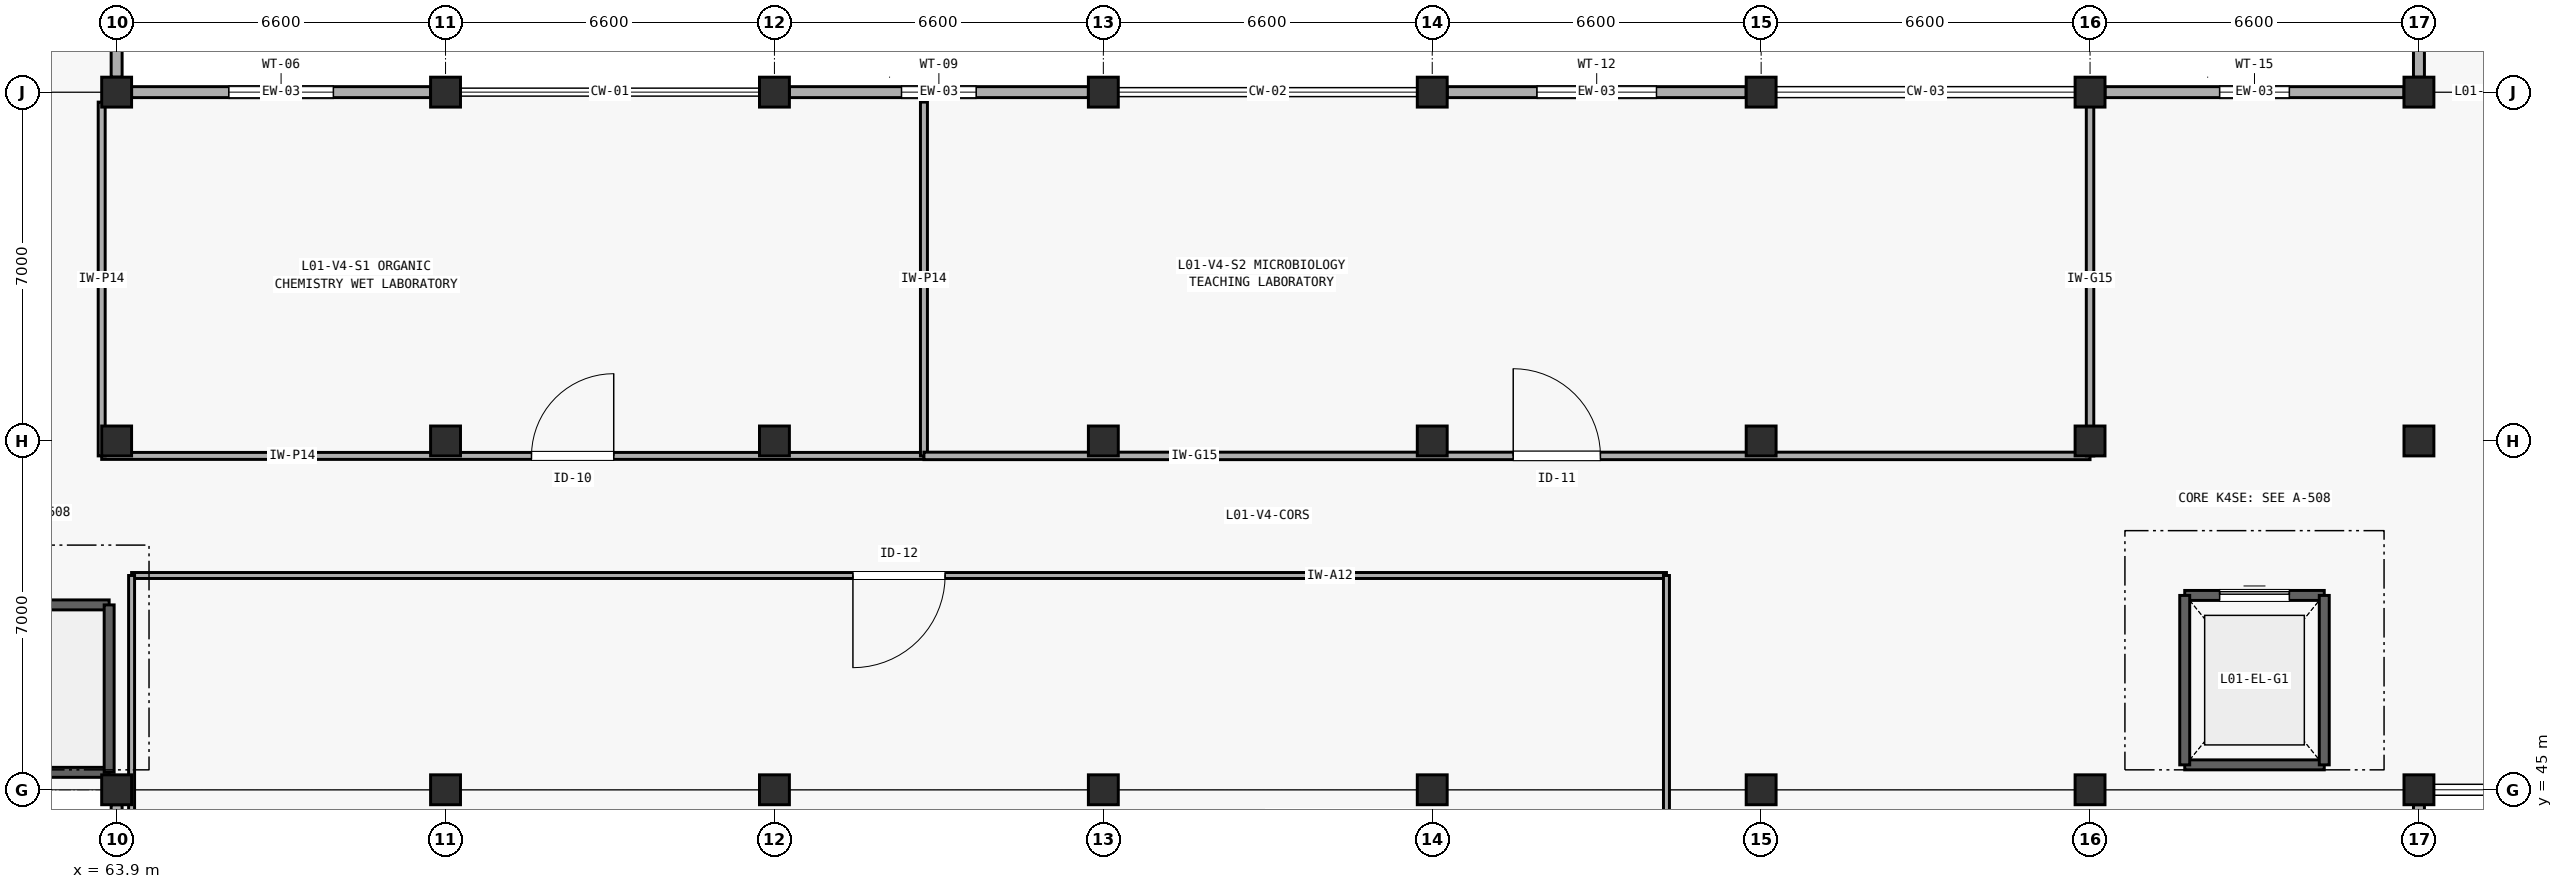
"""IFC4 building model, lengths in metres.
Left out: names, types, materials, properties, quantities, classifications, styles, units other than length and angle.
Written with IfcOpenShell. Run it as: python <this file> out.ifc"""

import sys

from ifc_helpers import new_model, si_unit, direction, frame, frame_2d, origin, origin_2d, place, context, subcontext, project, spatial, rectangle, extrude, element, fill, save


model = new_model("IFC4")
c1 = context("Model", 3, precision=1e-05, world=origin(), true_north=direction((0.0, 1.0)))
c2 = subcontext(c1, "Body", "Model", "MODEL_VIEW")
j1 = project(units=[si_unit("LENGTHUNIT", "METRE"), si_unit("PLANEANGLEUNIT", "RADIAN")], contexts=[c1])
p1 = place(None, origin())
s1 = spatial("IfcSite", under=j1, at=p1, CompositionType="ELEMENT")
p2 = place(p1, origin())
s2 = spatial("IfcBuilding", under=s1, at=p2, CompositionType="ELEMENT")
p3 = place(p2, frame((0.0, 0.0, 4.2)))
s3 = spatial("IfcBuildingStorey", under=s2, at=p3, CompositionType="ELEMENT", Elevation=4.2)
for number, where, z_axis, x_axis in (
    (1, (63.9, 45.0, 0.0), (0.0, 0.0, 1.0), (1.0, 0.0, 0.0)),
    (2, (63.9, 52.0, 0.0), (0.0, 0.0, 1.0), (1.0, 0.0, 0.0)),
    (3, (63.9, 59.0, 0.0), (0.0, 0.0, 1.0), (1.0, 0.0, 0.0)),
    (4, (70.5, 45.0, 0.0), (0.0, 0.0, 1.0), (1.0, 0.0, 0.0)),
    (5, (70.5, 52.0, 0.0), (0.0, 0.0, 1.0), (1.0, 0.0, 0.0)),
    (6, (70.5, 59.0, 0.0), (0.0, 0.0, 1.0), (1.0, 0.0, 0.0)),
    (7, (77.1, 45.0, 0.0), (0.0, 0.0, 1.0), (1.0, 0.0, 0.0)),
    (8, (77.1, 52.0, 0.0), (0.0, 0.0, 1.0), (1.0, 0.0, 0.0)),
    (9, (77.1, 59.0, 0.0), (0.0, 0.0, 1.0), (1.0, 0.0, 0.0)),
    (10, (83.7, 45.0, 0.0), (0.0, 0.0, 1.0), (1.0, 0.0, 0.0)),
    (11, (83.7, 52.0, 0.0), (0.0, 0.0, 1.0), (1.0, 0.0, 0.0)),
    (12, (83.7, 59.0, 0.0), (0.0, 0.0, 1.0), (1.0, 0.0, 0.0)),
    (13, (90.3, 45.0, 0.0), (0.0, 0.0, 1.0), (1.0, 0.0, 0.0)),
    (14, (90.3, 52.0, 0.0), (0.0, 0.0, 1.0), (1.0, 0.0, 0.0)),
    (15, (90.3, 59.0, 0.0), (0.0, 0.0, 1.0), (1.0, 0.0, 0.0)),
    (16, (96.9, 45.0, 0.0), (0.0, 0.0, 1.0), (1.0, 0.0, 0.0)),
    (17, (96.9, 52.0, 0.0), (0.0, 0.0, 1.0), (1.0, 0.0, 0.0)),
    (18, (96.9, 59.0, 0.0), (0.0, 0.0, 1.0), (1.0, 0.0, 0.0)),
    (19, (103.5, 45.0, 0.0), (0.0, 0.0, 1.0), (1.0, 0.0, 0.0)),
    (20, (103.5, 52.0, 0.0), (0.0, 0.0, 1.0), (1.0, 0.0, 0.0)),
    (21, (103.5, 59.0, 0.0), (0.0, 0.0, 1.0), (1.0, 0.0, 0.0)),
    (22, (110.1, 45.0, 0.0), (0.0, 0.0, 1.0), (1.0, 0.0, 0.0)),
    (23, (110.1, 52.0, 0.0), (0.0, 0.0, 1.0), (1.0, 0.0, 0.0)),
    (24, (110.1, 59.0, 0.0), (0.0, 0.0, 1.0), (1.0, 0.0, 0.0)),
):
    element("IfcColumn", number, at=place(p3, frame(where, z_axis=z_axis, x_axis=x_axis)), inside=s3, PredefinedType="COLUMN", context=c2, shape_type="SweptSolid", body=[
        extrude(rectangle(XDim=0.6, YDim=0.6, at=origin_2d()), origin(), (0.0, 0.0, 1.0), 4.2),
    ])
p4 = place(p3, frame((64.2, 59.0, 0.0), z_axis=(0.0, 0.0, 1.0), x_axis=(1.0, 0.0, 0.0)))
e25 = element("IfcWall", 25, at=p4, inside=s3, PredefinedType="SOLIDWALL", context=c2, shape_type="SweptSolid", body=[
    extrude(rectangle(XDim=6.0, YDim=0.22, at=frame_2d((3.0, 0.0))), origin(), (0.0, 0.0, 1.0), 3.135),
])
p5 = place(p4, frame((1.95, 0.0, 0.85)))
e26 = element("IfcOpeningElement", 26, at=p5, cuts=e25, PredefinedType="OPENING", context=c2, shape_type="SweptSolid", body=[
    extrude(rectangle(XDim=2.1, YDim=1.35, at=frame_2d((1.05, 0.675))), frame((0.0, 0.12, 0.0), z_axis=(0.0, -1.0, 0.0), x_axis=(1.0, 0.0, 0.0)), (0.0, 0.0, 1.0), 0.24),
])
p6 = place(p3, frame((77.4, 59.0, 0.0), z_axis=(0.0, 0.0, 1.0), x_axis=(1.0, 0.0, 0.0)))
e27 = element("IfcWall", 27, at=p6, inside=s3, PredefinedType="SOLIDWALL", context=c2, shape_type="SweptSolid", body=[
    extrude(rectangle(XDim=6.0, YDim=0.22, at=frame_2d((3.0, 0.0))), origin(), (0.0, 0.0, 1.0), 3.235),
])
p7 = place(p6, frame((2.25, 0.0, 0.85)))
e28 = element("IfcOpeningElement", 28, at=p7, cuts=e27, PredefinedType="OPENING", context=c2, shape_type="SweptSolid", body=[
    extrude(rectangle(XDim=1.5, YDim=1.5, at=frame_2d((0.75, 0.75))), frame((0.0, 0.12, 0.0), z_axis=(0.0, -1.0, 0.0), x_axis=(1.0, 0.0, 0.0)), (0.0, 0.0, 1.0), 0.24),
])
p8 = place(p3, frame((90.6, 59.0, 0.0), z_axis=(0.0, 0.0, 1.0), x_axis=(1.0, 0.0, 0.0)))
e29 = element("IfcWall", 29, at=p8, inside=s3, PredefinedType="SOLIDWALL", context=c2, shape_type="SweptSolid", body=[
    extrude(rectangle(XDim=6.0, YDim=0.22, at=frame_2d((3.0, 0.0))), origin(), (0.0, 0.0, 1.0), 3.285),
])
p9 = place(p8, frame((1.8, 0.0, 0.85)))
e30 = element("IfcOpeningElement", 30, at=p9, cuts=e29, PredefinedType="OPENING", context=c2, shape_type="SweptSolid", body=[
    extrude(rectangle(XDim=2.4, YDim=1.5, at=frame_2d((1.2, 0.75))), frame((0.0, 0.12, 0.0), z_axis=(0.0, -1.0, 0.0), x_axis=(1.0, 0.0, 0.0)), (0.0, 0.0, 1.0), 0.24),
])
p10 = place(p3, frame((103.8, 59.0, 0.0), z_axis=(0.0, 0.0, 1.0), x_axis=(1.0, 0.0, 0.0)))
e31 = element("IfcWall", 31, at=p10, inside=s3, PredefinedType="SOLIDWALL", context=c2, shape_type="SweptSolid", body=[
    extrude(rectangle(XDim=6.0, YDim=0.22, at=frame_2d((3.0, 0.0))), origin(), (0.0, 0.0, 1.0), 3.385),
])
p11 = place(p10, frame((2.3, 0.0, 0.85)))
e32 = element("IfcOpeningElement", 32, at=p11, cuts=e31, PredefinedType="OPENING", context=c2, shape_type="SweptSolid", body=[
    extrude(rectangle(XDim=1.4, YDim=1.25, at=frame_2d((0.7, 0.625))), frame((0.0, 0.12, 0.0), z_axis=(0.0, -1.0, 0.0), x_axis=(1.0, 0.0, 0.0)), (0.0, 0.0, 1.0), 0.24),
])
p12 = place(p3, frame((63.9, 38.325, 0.0), z_axis=(0.0, 0.0, 1.0), x_axis=(0.0, 1.0, 0.0)))
e33 = element("IfcWall", 33, at=p12, inside=s3, PredefinedType="SOLIDWALL", context=c2, shape_type="SweptSolid", body=[
    extrude(rectangle(XDim=6.375, YDim=0.22, at=frame_2d((3.188, 0.0))), origin(), (0.0, 0.0, 1.0), 3.565),
])
p13 = place(p12, frame((1.488, 0.0, 0.85)))
e34 = element("IfcOpeningElement", 34, at=p13, cuts=e33, PredefinedType="OPENING", context=c2, shape_type="SweptSolid", body=[
    extrude(rectangle(XDim=3.4, YDim=1.2, at=frame_2d((1.7, 0.6))), frame((0.0, 0.12, 0.0), z_axis=(0.0, -1.0, 0.0), x_axis=(1.0, 0.0, 0.0)), (0.0, 0.0, 1.0), 0.24),
])
p14 = place(p3, frame((63.9, 59.3, 0.0), z_axis=(0.0, 0.0, 1.0), x_axis=(0.0, 1.0, 0.0)))
e35 = element("IfcWall", 35, at=p14, inside=s3, PredefinedType="SOLIDWALL", context=c2, shape_type="SweptSolid", body=[
    extrude(rectangle(XDim=6.4, YDim=0.22, at=frame_2d((3.2, 0.0))), origin(), (0.0, 0.0, 1.0), 3.565),
])
p15 = place(p14, frame((2.725, 0.0, 0.85)))
e36 = element("IfcOpeningElement", 36, at=p15, cuts=e35, PredefinedType="OPENING", context=c2, shape_type="SweptSolid", body=[
    extrude(rectangle(XDim=0.95, YDim=1.55, at=frame_2d((0.475, 0.775))), frame((0.0, 0.12, 0.0), z_axis=(0.0, -1.0, 0.0), x_axis=(1.0, 0.0, 0.0)), (0.0, 0.0, 1.0), 0.24),
])
p16 = place(p3, frame((110.1, 38.325, 0.0), z_axis=(0.0, 0.0, 1.0), x_axis=(0.0, 1.0, 0.0)))
e37 = element("IfcWall", 37, at=p16, inside=s3, PredefinedType="SOLIDWALL", context=c2, shape_type="SweptSolid", body=[
    extrude(rectangle(XDim=6.375, YDim=0.22, at=frame_2d((3.188, 0.0))), origin(), (0.0, 0.0, 1.0), 3.505),
])
p17 = place(p16, frame((2.512, 0.0, 0.85)))
e38 = element("IfcOpeningElement", 38, at=p17, cuts=e37, PredefinedType="OPENING", context=c2, shape_type="SweptSolid", body=[
    extrude(rectangle(XDim=1.35, YDim=1.35, at=frame_2d((0.675, 0.675))), frame((0.0, 0.12, 0.0), z_axis=(0.0, -1.0, 0.0), x_axis=(1.0, 0.0, 0.0)), (0.0, 0.0, 1.0), 0.24),
])
p18 = place(p3, frame((110.1, 59.3, 0.0), z_axis=(0.0, 0.0, 1.0), x_axis=(0.0, 1.0, 0.0)))
e39 = element("IfcWall", 39, at=p18, inside=s3, PredefinedType="SOLIDWALL", context=c2, shape_type="SweptSolid", body=[
    extrude(rectangle(XDim=6.4, YDim=0.22, at=frame_2d((3.2, 0.0))), origin(), (0.0, 0.0, 1.0), 3.505),
])
p19 = place(p18, frame((2.375, 0.0, 0.85)))
e40 = element("IfcOpeningElement", 40, at=p19, cuts=e39, PredefinedType="OPENING", context=c2, shape_type="SweptSolid", body=[
    extrude(rectangle(XDim=1.65, YDim=1.35, at=frame_2d((0.825, 0.675))), frame((0.0, 0.12, 0.0), z_axis=(0.0, -1.0, 0.0), x_axis=(1.0, 0.0, 0.0)), (0.0, 0.0, 1.0), 0.24),
])
p20 = place(p3, frame((57.45, 45.35, 0.0), z_axis=(0.0, 0.0, 1.0), x_axis=(1.0, 0.0, 0.0)))
e41 = element("IfcWall", 41, at=p20, inside=s3, PredefinedType="SHEAR", context=c2, shape_type="SweptSolid", body=[
    extrude(rectangle(XDim=6.3, YDim=0.2, at=frame_2d((3.15, 0.0))), origin(), (0.0, 0.0, 1.0), 4.2),
])
p21 = place(p3, frame((57.45, 48.71, 0.0), z_axis=(0.0, 0.0, 1.0), x_axis=(1.0, 0.0, 0.0)))
e42 = element("IfcWall", 42, at=p21, inside=s3, PredefinedType="SHEAR", context=c2, shape_type="SweptSolid", body=[
    extrude(rectangle(XDim=6.3, YDim=0.2, at=frame_2d((3.15, 0.0))), origin(), (0.0, 0.0, 1.0), 4.2),
])
p22 = place(p21, frame((0.32, 0.0, 0.0)))
e43 = element("IfcOpeningElement", 43, at=p22, cuts=e42, PredefinedType="OPENING", context=c2, shape_type="SweptSolid", body=[
    extrude(rectangle(XDim=1.2, YDim=2.15, at=frame_2d((0.6, 1.075))), frame((0.0, 0.11, 0.0), z_axis=(0.0, -1.0, 0.0), x_axis=(1.0, 0.0, 0.0)), (0.0, 0.0, 1.0), 0.22),
])
p23 = place(p3, frame((63.75, 45.35, 0.0), z_axis=(0.0, 0.0, 1.0), x_axis=(0.0, 1.0, 0.0)))
e44 = element("IfcWall", 44, at=p23, inside=s3, PredefinedType="SHEAR", context=c2, shape_type="SweptSolid", body=[
    extrude(rectangle(XDim=3.36, YDim=0.2, at=frame_2d((1.68, 0.0))), origin(), (0.0, 0.0, 1.0), 4.2),
])
p24 = place(p3, frame((105.4, 45.5, 0.0), z_axis=(0.0, 0.0, 1.0), x_axis=(1.0, 0.0, 0.0)))
e45 = element("IfcWall", 45, at=p24, inside=s3, PredefinedType="SHEAR", context=c2, shape_type="SweptSolid", body=[
    extrude(rectangle(XDim=2.8, YDim=0.2, at=frame_2d((1.4, 0.0))), origin(), (0.0, 0.0, 1.0), 4.2),
])
p25 = place(p3, frame((105.4, 48.9, 0.0), z_axis=(0.0, 0.0, 1.0), x_axis=(1.0, 0.0, 0.0)))
e46 = element("IfcWall", 46, at=p25, inside=s3, PredefinedType="SHEAR", context=c2, shape_type="SweptSolid", body=[
    extrude(rectangle(XDim=2.8, YDim=0.2, at=frame_2d((1.4, 0.0))), origin(), (0.0, 0.0, 1.0), 4.2),
])
p26 = place(p25, frame((0.7, 0.0, 0.0)))
e47 = element("IfcOpeningElement", 47, at=p26, cuts=e46, PredefinedType="OPENING", context=c2, shape_type="SweptSolid", body=[
    extrude(rectangle(XDim=1.4, YDim=2.3, at=frame_2d((0.7, 1.15))), frame((0.0, 0.11, 0.0), z_axis=(0.0, -1.0, 0.0), x_axis=(1.0, 0.0, 0.0)), (0.0, 0.0, 1.0), 0.22),
])
for number, where, z_axis, x_axis in (
    (48, (105.4, 45.5, 0.0), (0.0, 0.0, 1.0), (0.0, 1.0, 0.0)),
    (49, (108.2, 45.5, 0.0), (0.0, 0.0, 1.0), (0.0, 1.0, 0.0)),
):
    element("IfcWall", number, at=place(p3, frame(where, z_axis=z_axis, x_axis=x_axis)), inside=s3, PredefinedType="SHEAR", context=c2, shape_type="SweptSolid", body=[
        extrude(rectangle(XDim=3.4, YDim=0.2, at=frame_2d((1.7, 0.0))), origin(), (0.0, 0.0, 1.0), 4.2),
    ])
p27 = place(p3, frame((63.6, 51.7, 0.0), z_axis=(0.0, 0.0, 1.0), x_axis=(1.0, 0.0, 0.0)))
e50 = element("IfcWall", 50, at=p27, inside=s3, PredefinedType="PLUMBINGWALL", context=c2, shape_type="SweptSolid", body=[
    extrude(rectangle(XDim=16.5, YDim=0.14, at=frame_2d((8.25, 0.0))), origin(), (0.0, 0.0, 1.0), 3.135),
])
p28 = place(p27, frame((8.625, 0.0, 0.0)))
e51 = element("IfcOpeningElement", 51, at=p28, cuts=e50, PredefinedType="OPENING", context=c2, shape_type="SweptSolid", body=[
    extrude(rectangle(XDim=1.65, YDim=2.25, at=frame_2d((0.825, 1.125))), frame((0.0, 0.08, 0.0), z_axis=(0.0, -1.0, 0.0), x_axis=(1.0, 0.0, 0.0)), (0.0, 0.0, 1.0), 0.16),
])
p29 = place(p3, frame((63.6, 51.7, 0.0), z_axis=(0.0, 0.0, 1.0), x_axis=(0.0, 1.0, 0.0)))
e52 = element("IfcWall", 52, at=p29, inside=s3, PredefinedType="PLUMBINGWALL", context=c2, shape_type="SweptSolid", body=[
    extrude(rectangle(XDim=7.1, YDim=0.14, at=frame_2d((3.55, 0.0))), origin(), (0.0, 0.0, 1.0), 3.405),
])
p30 = place(p3, frame((80.1, 51.7, 0.0), z_axis=(0.0, 0.0, 1.0), x_axis=(0.0, 1.0, 0.0)))
e53 = element("IfcWall", 53, at=p30, inside=s3, PredefinedType="PLUMBINGWALL", context=c2, shape_type="SweptSolid", body=[
    extrude(rectangle(XDim=7.1, YDim=0.14, at=frame_2d((3.55, 0.0))), origin(), (0.0, 0.0, 1.0), 3.532),
])
p31 = place(p3, frame((80.1, 51.7, 0.0), z_axis=(0.0, 0.0, 1.0), x_axis=(1.0, 0.0, 0.0)))
e54 = element("IfcWall", 54, at=p31, inside=s3, PredefinedType="PARTITIONING", context=c2, shape_type="SweptSolid", body=[
    extrude(rectangle(XDim=23.4, YDim=0.15, at=frame_2d((11.7, 0.0))), origin(), (0.0, 0.0, 1.0), 3.235),
])
p32 = place(p31, frame((11.825, 0.0, 0.0)))
e55 = element("IfcOpeningElement", 55, at=p32, cuts=e54, PredefinedType="OPENING", context=c2, shape_type="SweptSolid", body=[
    extrude(rectangle(XDim=1.75, YDim=2.25, at=frame_2d((0.875, 1.125))), frame((0.0, 0.085, 0.0), z_axis=(0.0, -1.0, 0.0), x_axis=(1.0, 0.0, 0.0)), (0.0, 0.0, 1.0), 0.17),
])
p33 = place(p3, frame((103.5, 51.7, 0.0), z_axis=(0.0, 0.0, 1.0), x_axis=(0.0, 1.0, 0.0)))
e56 = element("IfcWall", 56, at=p33, inside=s3, PredefinedType="PARTITIONING", context=c2, shape_type="SweptSolid", body=[
    extrude(rectangle(XDim=7.1, YDim=0.15, at=frame_2d((3.55, 0.0))), origin(), (0.0, 0.0, 1.0), 3.405),
])
p34 = place(p3, frame((64.2, 49.3, 0.0), z_axis=(0.0, 0.0, 1.0), x_axis=(1.0, 0.0, 0.0)))
e57 = element("IfcWall", 57, at=p34, inside=s3, PredefinedType="PARTITIONING", context=c2, shape_type="SweptSolid", body=[
    extrude(rectangle(XDim=30.8, YDim=0.12, at=frame_2d((15.4, 0.0))), origin(), (0.0, 0.0, 1.0), 3.9),
])
p35 = place(p34, frame((14.475, 0.0, 0.0)))
e58 = element("IfcOpeningElement", 58, at=p35, cuts=e57, PredefinedType="OPENING", context=c2, shape_type="SweptSolid", body=[
    extrude(rectangle(XDim=1.85, YDim=2.3, at=frame_2d((0.925, 1.15))), frame((0.0, 0.07, 0.0), z_axis=(0.0, -1.0, 0.0), x_axis=(1.0, 0.0, 0.0)), (0.0, 0.0, 1.0), 0.14),
])
for number, where, z_axis, x_axis in (
    (59, (64.2, 38.2, 0.0), (0.0, 0.0, 1.0), (0.0, 1.0, 0.0)),
    (60, (95.0, 38.2, 0.0), (0.0, 0.0, 1.0), (0.0, 1.0, 0.0)),
):
    element("IfcWall", number, at=place(p3, frame(where, z_axis=z_axis, x_axis=x_axis)), inside=s3, PredefinedType="PARTITIONING", context=c2, shape_type="SweptSolid", body=[
        extrude(rectangle(XDim=11.1, YDim=0.12, at=frame_2d((5.55, 0.0))), origin(), (0.0, 0.0, 1.0), 3.9),
    ])
p36 = place(p5, origin())
e61 = element("IfcWindow", 61, at=p36, inside=s3, PartitioningType="SINGLE_PANEL", PredefinedType="WINDOW", context=c2, shape_type="SweptSolid", body=[
    extrude(rectangle(XDim=2.1, YDim=1.35, at=frame_2d((1.05, 0.675))), frame((0.0, 0.03, 0.0), z_axis=(0.0, -1.0, 0.0), x_axis=(1.0, 0.0, 0.0)), (0.0, 0.0, 1.0), 0.06),
])
fill(e26, e61)
p37 = place(p7, origin())
e62 = element("IfcWindow", 62, at=p37, inside=s3, PartitioningType="SINGLE_PANEL", PredefinedType="WINDOW", context=c2, shape_type="SweptSolid", body=[
    extrude(rectangle(XDim=1.5, YDim=1.5, at=frame_2d((0.75, 0.75))), frame((0.0, 0.03, 0.0), z_axis=(0.0, -1.0, 0.0), x_axis=(1.0, 0.0, 0.0)), (0.0, 0.0, 1.0), 0.06),
])
fill(e28, e62)
p38 = place(p9, origin())
e63 = element("IfcWindow", 63, at=p38, inside=s3, PartitioningType="SINGLE_PANEL", PredefinedType="WINDOW", context=c2, shape_type="SweptSolid", body=[
    extrude(rectangle(XDim=2.4, YDim=1.5, at=frame_2d((1.2, 0.75))), frame((0.0, 0.03, 0.0), z_axis=(0.0, -1.0, 0.0), x_axis=(1.0, 0.0, 0.0)), (0.0, 0.0, 1.0), 0.06),
])
fill(e30, e63)
p39 = place(p11, origin())
e64 = element("IfcWindow", 64, at=p39, inside=s3, PartitioningType="SINGLE_PANEL", PredefinedType="WINDOW", context=c2, shape_type="SweptSolid", body=[
    extrude(rectangle(XDim=1.4, YDim=1.25, at=frame_2d((0.7, 0.625))), frame((0.0, 0.03, 0.0), z_axis=(0.0, -1.0, 0.0), x_axis=(1.0, 0.0, 0.0)), (0.0, 0.0, 1.0), 0.06),
])
fill(e32, e64)
p40 = place(p26, origin())
e65 = element("IfcDoor", 65, at=p40, inside=s3, OperationType="SLIDING_TO_LEFT", PredefinedType="DOOR", context=c2, shape_type="SweptSolid", body=[
    extrude(rectangle(XDim=1.4, YDim=2.3, at=frame_2d((0.7, 1.15))), frame((0.0, 0.025, 0.0), z_axis=(0.0, -1.0, 0.0), x_axis=(1.0, 0.0, 0.0)), (0.0, 0.0, 1.0), 0.05),
])
fill(e47, e65)
p41 = place(p28, origin())
e66 = element("IfcDoor", 66, at=p41, inside=s3, OperationType="SINGLE_SWING_RIGHT", PredefinedType="DOOR", context=c2, shape_type="SweptSolid", body=[
    extrude(rectangle(XDim=1.65, YDim=2.25, at=frame_2d((0.825, 1.125))), frame((0.0, 0.025, 0.0), z_axis=(0.0, -1.0, 0.0), x_axis=(1.0, 0.0, 0.0)), (0.0, 0.0, 1.0), 0.05),
])
fill(e51, e66)
p42 = place(p32, origin())
e67 = element("IfcDoor", 67, at=p42, inside=s3, OperationType="SINGLE_SWING_LEFT", PredefinedType="DOOR", context=c2, shape_type="SweptSolid", body=[
    extrude(rectangle(XDim=1.75, YDim=2.25, at=frame_2d((0.875, 1.125))), frame((0.0, 0.025, 0.0), z_axis=(0.0, -1.0, 0.0), x_axis=(1.0, 0.0, 0.0)), (0.0, 0.0, 1.0), 0.05),
])
fill(e55, e67)
p43 = place(p35, frame((1.85, 0.0, 0.0), z_axis=(0.0, 0.0, 1.0), x_axis=(-1.0, 0.0, 0.0)))
e68 = element("IfcDoor", 68, at=p43, inside=s3, OperationType="SINGLE_SWING_RIGHT", PredefinedType="DOOR", context=c2, shape_type="SweptSolid", body=[
    extrude(rectangle(XDim=1.85, YDim=2.3, at=frame_2d((0.925, 1.15))), frame((0.0, 0.025, 0.0), z_axis=(0.0, -1.0, 0.0), x_axis=(1.0, 0.0, 0.0)), (0.0, 0.0, 1.0), 0.05),
])
fill(e58, e68)
save(model, sys.argv[1])
